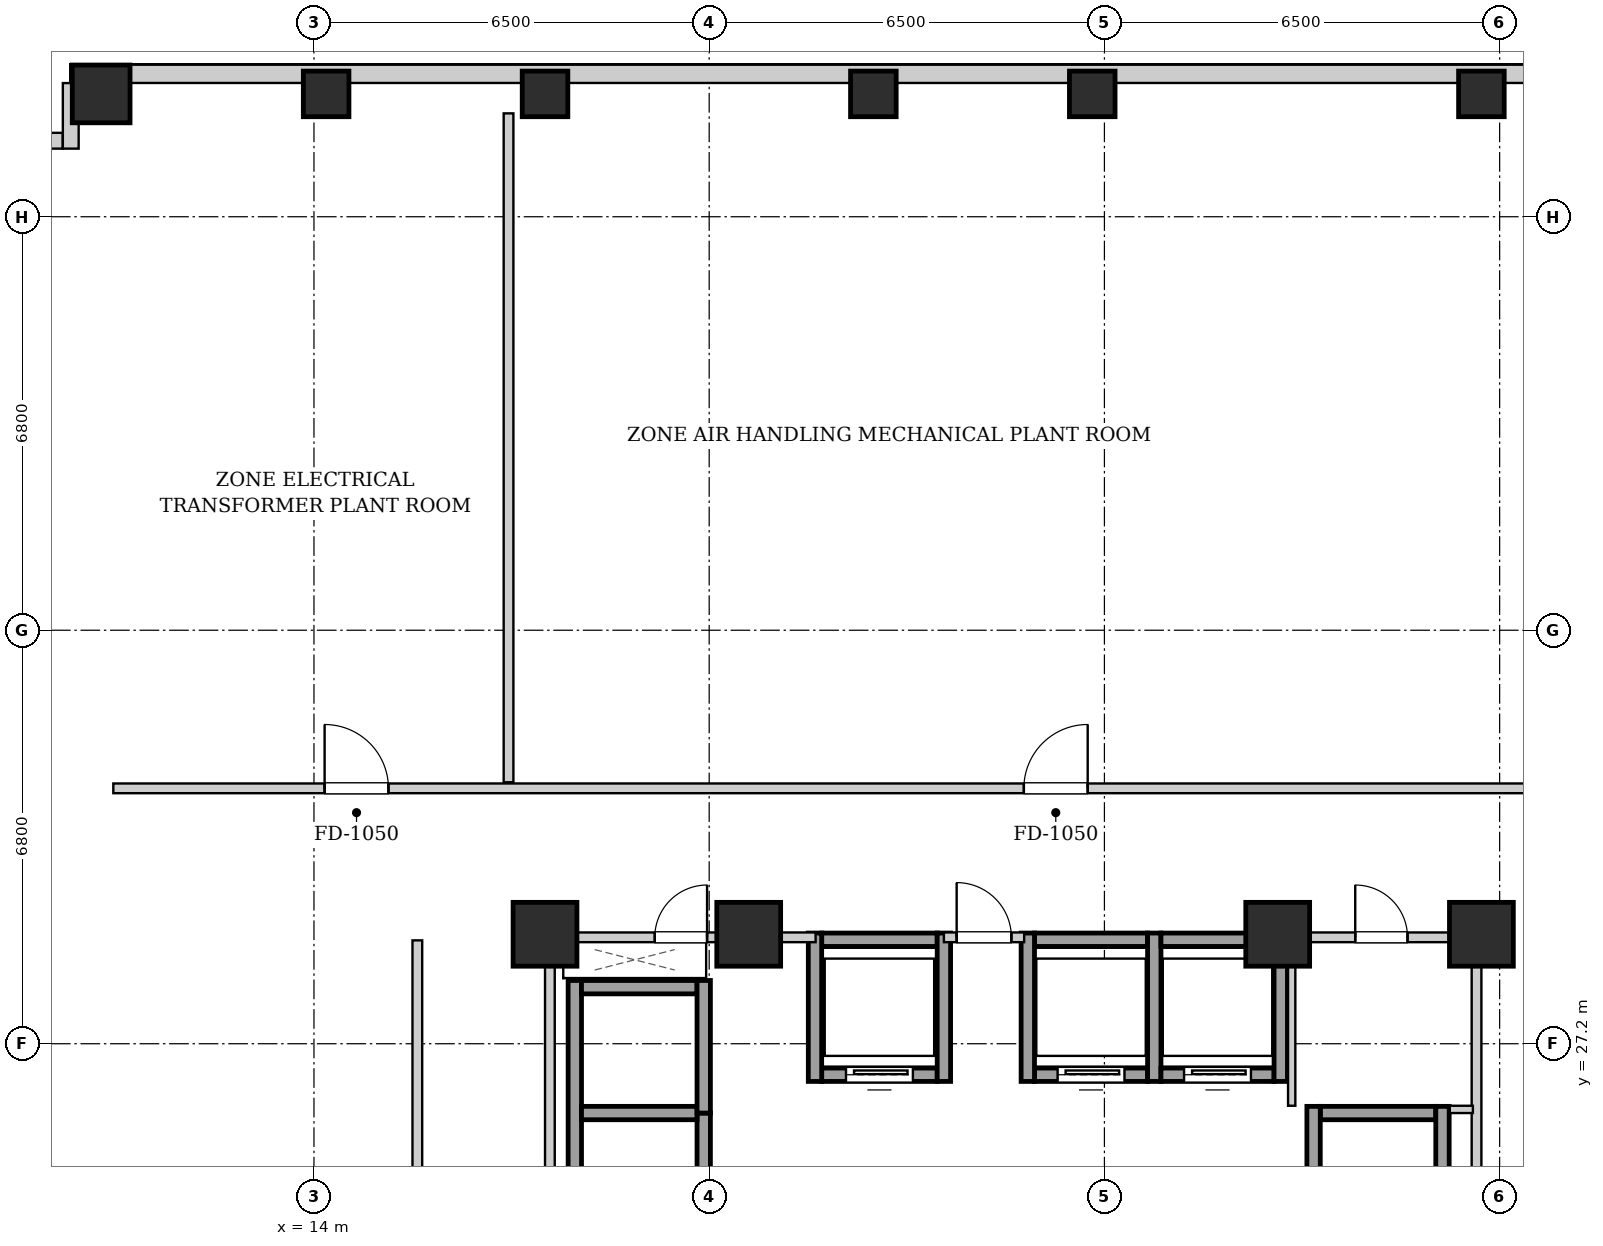
"""IFC4 building model, lengths in metres.
Left out: names, types, materials, properties, quantities, classifications, styles, units other than length and angle.
Written with IfcOpenShell. Run it as: python <this file> out.ifc"""

import sys

from ifc_helpers import new_model, si_unit, direction, frame, frame_2d, origin, origin_2d, place, context, subcontext, project, spatial, rectangle, extrude, element, fill, save


model = new_model("IFC4")
c1 = context("Model", 3, precision=1e-05, world=origin(), true_north=direction((0.0, 1.0)))
c2 = subcontext(c1, "Body", "Model", "MODEL_VIEW")
j1 = project(units=[si_unit("LENGTHUNIT", "METRE"), si_unit("PLANEANGLEUNIT", "RADIAN")], contexts=[c1])
p1 = place(None, origin())
s1 = spatial("IfcSite", under=j1, at=p1, CompositionType="ELEMENT")
p2 = place(p1, origin())
s2 = spatial("IfcBuilding", under=s1, at=p2, CompositionType="ELEMENT")
p3 = place(p2, frame((0.0, 0.0, 119.9)))
s3 = spatial("IfcBuildingStorey", under=s2, at=p3, CompositionType="ELEMENT", Elevation=119.9)
p4 = place(p3, frame((10.5, 42.82, 0.0), z_axis=(0.0, 0.0, 1.0), x_axis=(1.0, 0.0, 0.0)))
e1 = element("IfcColumn", 1, at=p4, inside=s3, PredefinedType="COLUMN", context=c2, shape_type="SweptSolid", body=[
    extrude(rectangle(XDim=0.95, YDim=0.95, at=origin_2d()), origin(), (0.0, 0.0, 1.0), 4.5),
])
for number, where, z_axis, x_axis in (
    (2, (14.2, 42.82, 0.0), (0.0, 0.0, 1.0), (1.0, 0.0, 0.0)),
    (3, (17.8, 42.82, 0.0), (0.0, 0.0, 1.0), (1.0, 0.0, 0.0)),
    (4, (23.2, 42.82, 0.0), (0.0, 0.0, 1.0), (1.0, 0.0, 0.0)),
    (5, (26.8, 42.82, 0.0), (0.0, 0.0, 1.0), (1.0, 0.0, 0.0)),
    (6, (33.2, 42.82, 0.0), (0.0, 0.0, 1.0), (1.0, 0.0, 0.0)),
):
    element("IfcColumn", number, at=place(p3, frame(where, z_axis=z_axis, x_axis=x_axis)), inside=s3, PredefinedType="COLUMN", context=c2, shape_type="SweptSolid", body=[
        extrude(rectangle(XDim=0.75, YDim=0.75, at=origin_2d()), origin(), (0.0, 0.0, 1.0), 4.5),
    ])
for number, where, z_axis, x_axis in (
    (7, (17.8, 29.0, 0.0), (0.0, 0.0, 1.0), (1.0, 0.0, 0.0)),
    (8, (21.15, 29.0, 0.0), (0.0, 0.0, 1.0), (1.0, 0.0, 0.0)),
    (9, (29.85, 29.0, 0.0), (0.0, 0.0, 1.0), (1.0, 0.0, 0.0)),
    (10, (33.2, 29.0, 0.0), (0.0, 0.0, 1.0), (1.0, 0.0, 0.0)),
):
    element("IfcColumn", number, at=place(p3, frame(where, z_axis=z_axis, x_axis=x_axis)), inside=s3, PredefinedType="COLUMN", context=c2, shape_type="SweptSolid", body=[
        extrude(rectangle(XDim=1.05, YDim=1.05, at=origin_2d()), origin(), (0.0, 0.0, 1.0), 4.5),
    ])
p5 = place(p3, frame((10.0, 43.15, 0.0), z_axis=(0.0, 0.0, 1.0), x_axis=(1.0, 0.0, 0.0)))
e11 = element("IfcWall", 11, at=p5, inside=s3, PredefinedType="SOLIDWALL", context=c2, shape_type="SweptSolid", body=[
    extrude(rectangle(XDim=30.9, YDim=0.3, at=frame_2d((15.45, 0.0))), origin(), (0.0, 0.0, 1.0), 1.965),
])
p6 = place(p3, frame((8.882, 42.05, 0.0), z_axis=(0.0, 0.0, 1.0), x_axis=(1.0, 0.0, 0.0)))
e12 = element("IfcWall", 12, at=p6, inside=s3, PredefinedType="SOLIDWALL", context=c2, shape_type="SweptSolid", body=[
    extrude(rectangle(XDim=0.986, YDim=0.26, at=frame_2d((0.493, 0.0))), origin(), (0.0, 0.0, 1.0), 4.18),
])
p7 = place(p3, frame((10.0, 41.92, 0.0), z_axis=(0.0, 0.0, 1.0), x_axis=(0.0, 1.0, 0.0)))
e13 = element("IfcWall", 13, at=p7, inside=s3, PredefinedType="SOLIDWALL", context=c2, shape_type="SweptSolid", body=[
    extrude(rectangle(XDim=1.078, YDim=0.26, at=frame_2d((0.539, 0.0))), origin(), (0.0, 0.0, 1.0), 4.18),
])
p8 = place(p3, frame((22.35, 26.69, 0.0), z_axis=(0.0, 0.0, 1.0), x_axis=(1.0, 0.0, 0.0)))
e14 = element("IfcWall", 14, at=p8, inside=s3, PredefinedType="SHEAR", context=c2, shape_type="SweptSolid", body=[
    extrude(rectangle(XDim=1.9, YDim=0.22, at=frame_2d((0.95, 0.0))), origin(), (0.0, 0.0, 1.0), 4.18),
])
p9 = place(p8, frame((0.4, 0.0, 0.0)))
e15 = element("IfcOpeningElement", 15, at=p9, cuts=e14, PredefinedType="OPENING", context=c2, shape_type="SweptSolid", body=[
    extrude(rectangle(XDim=1.1, YDim=2.15, at=frame_2d((0.55, 1.075))), frame((0.0, 0.12, 0.0), z_axis=(0.0, -1.0, 0.0), x_axis=(1.0, 0.0, 0.0)), (0.0, 0.0, 1.0), 0.24),
])
p10 = place(p3, frame((22.35, 28.91, 0.0), z_axis=(0.0, 0.0, 1.0), x_axis=(1.0, 0.0, 0.0)))
e16 = element("IfcWall", 16, at=p10, inside=s3, PredefinedType="SHEAR", context=c2, shape_type="SweptSolid", body=[
    extrude(rectangle(XDim=1.9, YDim=0.22, at=frame_2d((0.95, 0.0))), origin(), (0.0, 0.0, 1.0), 4.18),
])
for number, where, z_axis, x_axis in (
    (17, (22.24, 26.58, 0.0), (0.0, 0.0, 1.0), (0.0, 1.0, 0.0)),
    (18, (24.36, 26.58, 0.0), (0.0, 0.0, 1.0), (0.0, 1.0, 0.0)),
):
    element("IfcWall", number, at=place(p3, frame(where, z_axis=z_axis, x_axis=x_axis)), inside=s3, PredefinedType="SHEAR", context=c2, shape_type="SweptSolid", body=[
        extrude(rectangle(XDim=2.44, YDim=0.22, at=frame_2d((1.22, 0.0))), origin(), (0.0, 0.0, 1.0), 4.18),
    ])
p11 = place(p3, frame((25.85, 26.69, 0.0), z_axis=(0.0, 0.0, 1.0), x_axis=(1.0, 0.0, 0.0)))
e19 = element("IfcWall", 19, at=p11, inside=s3, PredefinedType="SHEAR", context=c2, shape_type="SweptSolid", body=[
    extrude(rectangle(XDim=1.86, YDim=0.22, at=frame_2d((0.93, 0.0))), origin(), (0.0, 0.0, 1.0), 4.18),
])
p12 = place(p11, frame((0.38, 0.0, 0.0)))
e20 = element("IfcOpeningElement", 20, at=p12, cuts=e19, PredefinedType="OPENING", context=c2, shape_type="SweptSolid", body=[
    extrude(rectangle(XDim=1.1, YDim=2.15, at=frame_2d((0.55, 1.075))), frame((0.0, 0.12, 0.0), z_axis=(0.0, -1.0, 0.0), x_axis=(1.0, 0.0, 0.0)), (0.0, 0.0, 1.0), 0.24),
])
p13 = place(p3, frame((25.85, 28.91, 0.0), z_axis=(0.0, 0.0, 1.0), x_axis=(1.0, 0.0, 0.0)))
e21 = element("IfcWall", 21, at=p13, inside=s3, PredefinedType="SHEAR", context=c2, shape_type="SweptSolid", body=[
    extrude(rectangle(XDim=1.86, YDim=0.22, at=frame_2d((0.93, 0.0))), origin(), (0.0, 0.0, 1.0), 4.18),
])
for number, where, z_axis, x_axis in (
    (22, (25.74, 26.58, 0.0), (0.0, 0.0, 1.0), (0.0, 1.0, 0.0)),
    (23, (27.82, 26.58, 0.0), (0.0, 0.0, 1.0), (0.0, 1.0, 0.0)),
):
    element("IfcWall", number, at=place(p3, frame(where, z_axis=z_axis, x_axis=x_axis)), inside=s3, PredefinedType="SHEAR", context=c2, shape_type="SweptSolid", body=[
        extrude(rectangle(XDim=2.44, YDim=0.22, at=frame_2d((1.22, 0.0))), origin(), (0.0, 0.0, 1.0), 4.18),
    ])
p14 = place(p3, frame((27.93, 26.69, 0.0), z_axis=(0.0, 0.0, 1.0), x_axis=(1.0, 0.0, 0.0)))
e24 = element("IfcWall", 24, at=p14, inside=s3, PredefinedType="SHEAR", context=c2, shape_type="SweptSolid", body=[
    extrude(rectangle(XDim=1.86, YDim=0.22, at=frame_2d((0.93, 0.0))), origin(), (0.0, 0.0, 1.0), 4.18),
])
p15 = place(p14, frame((0.38, 0.0, 0.0)))
e25 = element("IfcOpeningElement", 25, at=p15, cuts=e24, PredefinedType="OPENING", context=c2, shape_type="SweptSolid", body=[
    extrude(rectangle(XDim=1.1, YDim=2.15, at=frame_2d((0.55, 1.075))), frame((0.0, 0.12, 0.0), z_axis=(0.0, -1.0, 0.0), x_axis=(1.0, 0.0, 0.0)), (0.0, 0.0, 1.0), 0.24),
])
p16 = place(p3, frame((27.93, 28.91, 0.0), z_axis=(0.0, 0.0, 1.0), x_axis=(1.0, 0.0, 0.0)))
e26 = element("IfcWall", 26, at=p16, inside=s3, PredefinedType="SHEAR", context=c2, shape_type="SweptSolid", body=[
    extrude(rectangle(XDim=1.86, YDim=0.22, at=frame_2d((0.93, 0.0))), origin(), (0.0, 0.0, 1.0), 4.18),
])
p17 = place(p3, frame((29.9, 26.58, 0.0), z_axis=(0.0, 0.0, 1.0), x_axis=(0.0, 1.0, 0.0)))
e27 = element("IfcWall", 27, at=p17, inside=s3, PredefinedType="SHEAR", context=c2, shape_type="SweptSolid", body=[
    extrude(rectangle(XDim=2.44, YDim=0.22, at=frame_2d((1.22, 0.0))), origin(), (0.0, 0.0, 1.0), 4.18),
])
p18 = place(p3, frame((18.29, 24.1, 0.0), z_axis=(0.0, 0.0, 1.0), x_axis=(0.0, 1.0, 0.0)))
e28 = element("IfcWall", 28, at=p18, inside=s3, PredefinedType="SHEAR", context=c2, shape_type="SweptSolid", body=[
    extrude(rectangle(XDim=4.14, YDim=0.22, at=frame_2d((2.07, 0.0))), origin(), (0.0, 0.0, 1.0), 4.18),
])
p19 = place(p3, frame((20.41, 24.1, 0.0), z_axis=(0.0, 0.0, 1.0), x_axis=(0.0, 1.0, 0.0)))
e29 = element("IfcWall", 29, at=p19, inside=s3, PredefinedType="SHEAR", context=c2, shape_type="SweptSolid", body=[
    extrude(rectangle(XDim=1.96, YDim=0.22, at=frame_2d((0.98, 0.0))), origin(), (0.0, 0.0, 1.0), 4.18),
])
for number, where, z_axis, x_axis in (
    (30, (18.4, 26.06, 0.0), (0.0, 0.0, 1.0), (1.0, 0.0, 0.0)),
    (31, (18.4, 28.13, 0.0), (0.0, 0.0, 1.0), (1.0, 0.0, 0.0)),
):
    element("IfcWall", number, at=place(p3, frame(where, z_axis=z_axis, x_axis=x_axis)), inside=s3, PredefinedType="SHEAR", context=c2, shape_type="SweptSolid", body=[
        extrude(rectangle(XDim=1.9, YDim=0.22, at=frame_2d((0.95, 0.0))), origin(), (0.0, 0.0, 1.0), 4.18),
    ])
p20 = place(p3, frame((20.41, 26.06, 0.0), z_axis=(0.0, 0.0, 1.0), x_axis=(0.0, 1.0, 0.0)))
e32 = element("IfcWall", 32, at=p20, inside=s3, PredefinedType="SHEAR", context=c2, shape_type="SweptSolid", body=[
    extrude(rectangle(XDim=2.18, YDim=0.22, at=frame_2d((1.09, 0.0))), origin(), (0.0, 0.0, 1.0), 4.18),
])
p21 = place(p3, frame((30.55, 26.06, 0.0), z_axis=(0.0, 0.0, 1.0), x_axis=(1.0, 0.0, 0.0)))
e33 = element("IfcWall", 33, at=p21, inside=s3, PredefinedType="SHEAR", context=c2, shape_type="SweptSolid", body=[
    extrude(rectangle(XDim=1.9, YDim=0.22, at=frame_2d((0.95, 0.0))), origin(), (0.0, 0.0, 1.0), 4.18),
])
for number, where, z_axis, x_axis in (
    (34, (30.44, 24.1, 0.0), (0.0, 0.0, 1.0), (0.0, 1.0, 0.0)),
    (35, (32.56, 24.1, 0.0), (0.0, 0.0, 1.0), (0.0, 1.0, 0.0)),
):
    element("IfcWall", number, at=place(p3, frame(where, z_axis=z_axis, x_axis=x_axis)), inside=s3, PredefinedType="SHEAR", context=c2, shape_type="SweptSolid", body=[
        extrude(rectangle(XDim=2.07, YDim=0.22, at=frame_2d((1.035, 0.0))), origin(), (0.0, 0.0, 1.0), 4.18),
    ])
for number, where, z_axis, x_axis in (
    (36, (17.88, 24.12, 0.0), (0.0, 0.0, 1.0), (0.0, 1.0, 0.0)),
    (37, (33.12, 24.12, 0.0), (0.0, 0.0, 1.0), (0.0, 1.0, 0.0)),
):
    element("IfcWall", number, at=place(p3, frame(where, z_axis=z_axis, x_axis=x_axis)), inside=s3, PredefinedType="PARTITIONING", context=c2, shape_type="SweptSolid", body=[
        extrude(rectangle(XDim=4.76, YDim=0.16, at=frame_2d((2.38, 0.0))), origin(), (0.0, 0.0, 1.0), 4.18),
    ])
p22 = place(p3, frame((24.36, 28.95, 0.0), z_axis=(0.0, 0.0, 1.0), x_axis=(1.0, 0.0, 0.0)))
e38 = element("IfcWall", 38, at=p22, inside=s3, PredefinedType="PARTITIONING", context=c2, shape_type="SweptSolid", body=[
    extrude(rectangle(XDim=1.32, YDim=0.16, at=frame_2d((0.66, 0.0))), origin(), (0.0, 0.0, 1.0), 4.18),
])
p23 = place(p22, frame((0.21, 0.0, 0.0)))
e39 = element("IfcOpeningElement", 39, at=p23, cuts=e38, PredefinedType="OPENING", context=c2, shape_type="SweptSolid", body=[
    extrude(rectangle(XDim=0.9, YDim=2.05, at=frame_2d((0.45, 1.025))), frame((0.0, 0.09, 0.0), z_axis=(0.0, -1.0, 0.0), x_axis=(1.0, 0.0, 0.0)), (0.0, 0.0, 1.0), 0.18),
])
p24 = place(p3, frame((17.96, 28.95, 0.0), z_axis=(0.0, 0.0, 1.0), x_axis=(1.0, 0.0, 0.0)))
e40 = element("IfcWall", 40, at=p24, inside=s3, PredefinedType="PARTITIONING", context=c2, shape_type="SweptSolid", body=[
    extrude(rectangle(XDim=4.29, YDim=0.16, at=frame_2d((2.145, 0.0))), origin(), (0.0, 0.0, 1.0), 4.18),
])
p25 = place(p24, frame((1.645, 0.0, 0.0)))
e41 = element("IfcOpeningElement", 41, at=p25, cuts=e40, PredefinedType="OPENING", context=c2, shape_type="SweptSolid", body=[
    extrude(rectangle(XDim=0.86, YDim=2.05, at=frame_2d((0.43, 1.025))), frame((0.0, 0.09, 0.0), z_axis=(0.0, -1.0, 0.0), x_axis=(1.0, 0.0, 0.0)), (0.0, 0.0, 1.0), 0.18),
])
p26 = place(p3, frame((30.08, 26.18, 0.0), z_axis=(0.0, 0.0, 1.0), x_axis=(0.0, 1.0, 0.0)))
e42 = element("IfcWall", 42, at=p26, inside=s3, PredefinedType="PARTITIONING", context=c2, shape_type="SweptSolid", body=[
    extrude(rectangle(XDim=2.68, YDim=0.12, at=frame_2d((1.34, 0.0))), origin(), (0.0, 0.0, 1.0), 4.18),
])
p27 = place(p3, frame((32.68, 26.12, 0.0), z_axis=(0.0, 0.0, 1.0), x_axis=(1.0, 0.0, 0.0)))
e43 = element("IfcWall", 43, at=p27, inside=s3, PredefinedType="PARTITIONING", context=c2, shape_type="SweptSolid", body=[
    extrude(rectangle(XDim=0.38, YDim=0.12, at=frame_2d((0.19, 0.0))), origin(), (0.0, 0.0, 1.0), 4.18),
])
p28 = place(p3, frame((30.08, 28.95, 0.0), z_axis=(0.0, 0.0, 1.0), x_axis=(1.0, 0.0, 0.0)))
e44 = element("IfcWall", 44, at=p28, inside=s3, PredefinedType="PARTITIONING", context=c2, shape_type="SweptSolid", body=[
    extrude(rectangle(XDim=2.96, YDim=0.16, at=frame_2d((1.48, 0.0))), origin(), (0.0, 0.0, 1.0), 4.18),
])
p29 = place(p28, frame((1.045, 0.0, 0.0)))
e45 = element("IfcOpeningElement", 45, at=p29, cuts=e44, PredefinedType="OPENING", context=c2, shape_type="SweptSolid", body=[
    extrude(rectangle(XDim=0.86, YDim=2.05, at=frame_2d((0.43, 1.025))), frame((0.0, 0.09, 0.0), z_axis=(0.0, -1.0, 0.0), x_axis=(1.0, 0.0, 0.0)), (0.0, 0.0, 1.0), 0.18),
])
p30 = place(p3, frame((10.7, 31.4, 0.0), z_axis=(0.0, 0.0, 1.0), x_axis=(1.0, 0.0, 0.0)))
e46 = element("IfcWall", 46, at=p30, inside=s3, PredefinedType="PARTITIONING", context=c2, shape_type="SweptSolid", body=[
    extrude(rectangle(XDim=29.5, YDim=0.16, at=frame_2d((14.75, 0.0))), origin(), (0.0, 0.0, 1.0), 4.18),
])
p31 = place(p30, frame((3.475, 0.0, 0.0)))
e47 = element("IfcOpeningElement", 47, at=p31, cuts=e46, PredefinedType="OPENING", context=c2, shape_type="SweptSolid", body=[
    extrude(rectangle(XDim=1.05, YDim=2.05, at=frame_2d((0.525, 1.025))), frame((0.0, 0.09, 0.0), z_axis=(0.0, -1.0, 0.0), x_axis=(1.0, 0.0, 0.0)), (0.0, 0.0, 1.0), 0.18),
])
p32 = place(p30, frame((14.975, 0.0, 0.0)))
e48 = element("IfcOpeningElement", 48, at=p32, cuts=e46, PredefinedType="OPENING", context=c2, shape_type="SweptSolid", body=[
    extrude(rectangle(XDim=1.05, YDim=2.05, at=frame_2d((0.525, 1.025))), frame((0.0, 0.09, 0.0), z_axis=(0.0, -1.0, 0.0), x_axis=(1.0, 0.0, 0.0)), (0.0, 0.0, 1.0), 0.18),
])
p33 = place(p3, frame((17.2, 31.5, 0.0), z_axis=(0.0, 0.0, 1.0), x_axis=(0.0, 1.0, 0.0)))
e49 = element("IfcWall", 49, at=p33, inside=s3, PredefinedType="PARTITIONING", context=c2, shape_type="SweptSolid", body=[
    extrude(rectangle(XDim=11.0, YDim=0.16, at=frame_2d((5.5, 0.0))), origin(), (0.0, 0.0, 1.0), 1.965),
])
p34 = place(p3, frame((15.7, 15.1, 0.0), z_axis=(0.0, 0.0, 1.0), x_axis=(0.0, 1.0, 0.0)))
e50 = element("IfcWall", 50, at=p34, inside=s3, PredefinedType="PARTITIONING", context=c2, shape_type="SweptSolid", body=[
    extrude(rectangle(XDim=13.8, YDim=0.16, at=frame_2d((6.9, 0.0))), origin(), (0.0, 0.0, 1.0), 4.18),
])
p35 = place(p34, frame((6.475, 0.0, 0.0)))
e51 = element("IfcOpeningElement", 51, at=p35, cuts=e50, PredefinedType="OPENING", context=c2, shape_type="SweptSolid", body=[
    extrude(rectangle(XDim=1.05, YDim=2.05, at=frame_2d((0.525, 1.025))), frame((0.0, 0.09, 0.0), z_axis=(0.0, -1.0, 0.0), x_axis=(1.0, 0.0, 0.0)), (0.0, 0.0, 1.0), 0.18),
])
p36 = place(p9, origin())
e52 = element("IfcDoor", 52, at=p36, inside=s3, OperationType="SLIDING_TO_LEFT", PredefinedType="DOOR", context=c2, shape_type="SweptSolid", body=[
    extrude(rectangle(XDim=1.1, YDim=2.15, at=frame_2d((0.55, 1.075))), frame((0.0, 0.025, 0.0), z_axis=(0.0, -1.0, 0.0), x_axis=(1.0, 0.0, 0.0)), (0.0, 0.0, 1.0), 0.05),
])
fill(e15, e52)
p37 = place(p12, origin())
e53 = element("IfcDoor", 53, at=p37, inside=s3, OperationType="SLIDING_TO_LEFT", PredefinedType="DOOR", context=c2, shape_type="SweptSolid", body=[
    extrude(rectangle(XDim=1.1, YDim=2.15, at=frame_2d((0.55, 1.075))), frame((0.0, 0.025, 0.0), z_axis=(0.0, -1.0, 0.0), x_axis=(1.0, 0.0, 0.0)), (0.0, 0.0, 1.0), 0.05),
])
fill(e20, e53)
p38 = place(p15, origin())
e54 = element("IfcDoor", 54, at=p38, inside=s3, OperationType="SLIDING_TO_LEFT", PredefinedType="DOOR", context=c2, shape_type="SweptSolid", body=[
    extrude(rectangle(XDim=1.1, YDim=2.15, at=frame_2d((0.55, 1.075))), frame((0.0, 0.025, 0.0), z_axis=(0.0, -1.0, 0.0), x_axis=(1.0, 0.0, 0.0)), (0.0, 0.0, 1.0), 0.05),
])
fill(e25, e54)
p39 = place(p23, origin())
e55 = element("IfcDoor", 55, at=p39, inside=s3, OperationType="SINGLE_SWING_LEFT", PredefinedType="DOOR", context=c2, shape_type="SweptSolid", body=[
    extrude(rectangle(XDim=0.9, YDim=2.05, at=frame_2d((0.45, 1.025))), frame((0.0, 0.025, 0.0), z_axis=(0.0, -1.0, 0.0), x_axis=(1.0, 0.0, 0.0)), (0.0, 0.0, 1.0), 0.05),
])
fill(e39, e55)
p40 = place(p25, origin())
e56 = element("IfcDoor", 56, at=p40, inside=s3, OperationType="SINGLE_SWING_RIGHT", PredefinedType="DOOR", context=c2, shape_type="SweptSolid", body=[
    extrude(rectangle(XDim=0.86, YDim=2.05, at=frame_2d((0.43, 1.025))), frame((0.0, 0.025, 0.0), z_axis=(0.0, -1.0, 0.0), x_axis=(1.0, 0.0, 0.0)), (0.0, 0.0, 1.0), 0.05),
])
fill(e41, e56)
p41 = place(p29, origin())
e57 = element("IfcDoor", 57, at=p41, inside=s3, OperationType="SINGLE_SWING_LEFT", PredefinedType="DOOR", context=c2, shape_type="SweptSolid", body=[
    extrude(rectangle(XDim=0.86, YDim=2.05, at=frame_2d((0.43, 1.025))), frame((0.0, 0.025, 0.0), z_axis=(0.0, -1.0, 0.0), x_axis=(1.0, 0.0, 0.0)), (0.0, 0.0, 1.0), 0.05),
])
fill(e45, e57)
p42 = place(p31, origin())
e58 = element("IfcDoor", 58, at=p42, inside=s3, OperationType="SINGLE_SWING_LEFT", PredefinedType="DOOR", context=c2, shape_type="SweptSolid", body=[
    extrude(rectangle(XDim=1.05, YDim=2.05, at=frame_2d((0.525, 1.025))), frame((0.0, 0.025, 0.0), z_axis=(0.0, -1.0, 0.0), x_axis=(1.0, 0.0, 0.0)), (0.0, 0.0, 1.0), 0.05),
])
fill(e47, e58)
p43 = place(p32, origin())
e59 = element("IfcDoor", 59, at=p43, inside=s3, OperationType="SINGLE_SWING_RIGHT", PredefinedType="DOOR", context=c2, shape_type="SweptSolid", body=[
    extrude(rectangle(XDim=1.05, YDim=2.05, at=frame_2d((0.525, 1.025))), frame((0.0, 0.025, 0.0), z_axis=(0.0, -1.0, 0.0), x_axis=(1.0, 0.0, 0.0)), (0.0, 0.0, 1.0), 0.05),
])
fill(e48, e59)
save(model, sys.argv[1])
